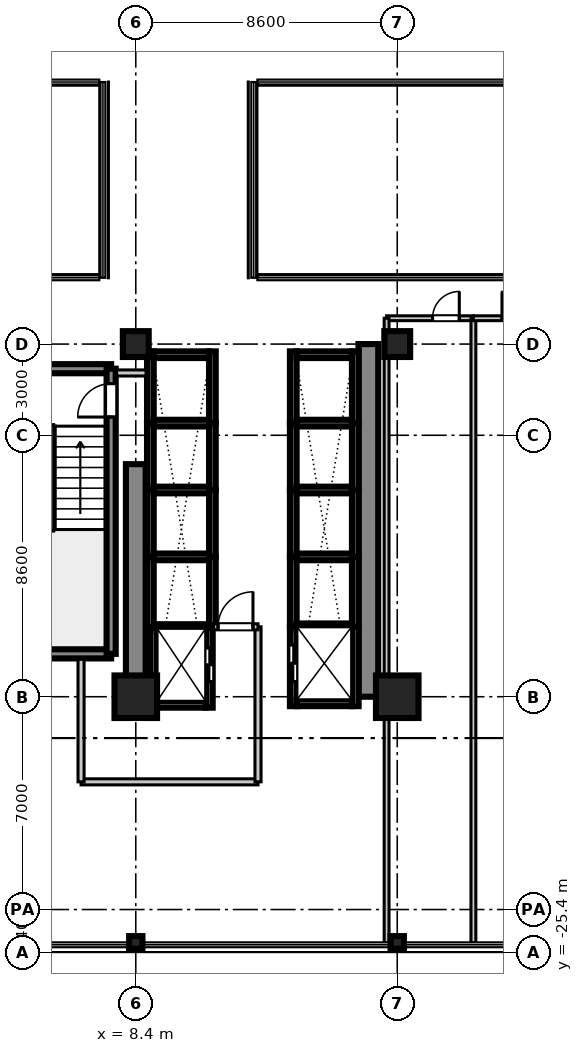
"""IFC4 building model, lengths in metres.
Left out: names, types, materials, properties, quantities, classifications, styles, units other than length and angle.
Written with IfcOpenShell. Run it as: python <this file> out.ifc"""

import sys

from ifc_helpers import new_model, si_unit, direction, frame, frame_2d, origin, origin_2d, place, context, subcontext, project, spatial, rectangle, i_section, extrude, source, transform, mapped, element, fill, save


model = new_model("IFC4")
c1 = context("Model", 3, precision=1e-05, world=origin(), true_north=direction((0.0, 1.0)))
c2 = subcontext(c1, "Body", "Model", "MODEL_VIEW")
j1 = project(units=[si_unit("LENGTHUNIT", "METRE"), si_unit("PLANEANGLEUNIT", "RADIAN")], contexts=[c1])
p1 = place(None, origin())
s1 = spatial("IfcSite", under=j1, at=p1, CompositionType="ELEMENT")
p2 = place(p1, origin())
s2 = spatial("IfcBuilding", under=s1, at=p2, CompositionType="ELEMENT")
p3 = place(p2, frame((0.0, 0.0, 54.3)))
s3 = spatial("IfcBuildingStorey", under=s2, at=p3, CompositionType="ELEMENT", Elevation=54.3)
m1 = source(origin(), c2, "Body", "SweptSolid", [
    extrude(rectangle(XDim=1.4, YDim=1.4, at=origin_2d()), origin(), (0.0, 0.0, 1.0), 3.605),
])
p4 = place(p3, frame((8.4, -17.0, 0.0), z_axis=(0.0, 0.0, 1.0), x_axis=(1.0, 0.0, 0.0)))
e1 = element("IfcColumn", 1, at=p4, inside=s3, PredefinedType="COLUMN", context=c2, shape_type="MappedRepresentation", body=[
    mapped(m1, transform((0.0, 0.0, 0.0), scale=1.0)),
])
m2 = source(origin(), c2, "Body", "SweptSolid", [
    extrude(rectangle(XDim=0.85, YDim=0.85, at=origin_2d()), origin(), (0.0, 0.0, 1.0), 3.605),
])
p5 = place(p3, frame((8.4, -5.4, 0.0), z_axis=(0.0, 0.0, 1.0), x_axis=(1.0, 0.0, 0.0)))
e2 = element("IfcColumn", 2, at=p5, inside=s3, PredefinedType="PILASTER", context=c2, shape_type="MappedRepresentation", body=[
    mapped(m2, transform((0.0, 0.0, 0.0), scale=1.0)),
])
p6 = place(p3, frame((17.0, -17.0, 0.0), z_axis=(0.0, 0.0, 1.0), x_axis=(1.0, 0.0, 0.0)))
e3 = element("IfcColumn", 3, at=p6, inside=s3, PredefinedType="COLUMN", context=c2, shape_type="MappedRepresentation", body=[
    mapped(m1, transform((0.0, 0.0, 0.0), scale=1.0)),
])
p7 = place(p3, frame((17.0, -5.4, 0.0), z_axis=(0.0, 0.0, 1.0), x_axis=(1.0, 0.0, 0.0)))
e4 = element("IfcColumn", 4, at=p7, inside=s3, PredefinedType="PILASTER", context=c2, shape_type="MappedRepresentation", body=[
    mapped(m2, transform((0.0, 0.0, 0.0), scale=1.0)),
])
m3 = source(origin(), c2, "Body", "SweptSolid", [
    extrude(i_section(OverallWidth=0.412, OverallDepth=0.438, WebThickness=0.023, FlangeThickness=0.036, at=origin_2d()), origin(), (0.0, 0.0, 1.0), 3.605),
])
for number, where, z_axis, x_axis in (
    (5, (8.4, -25.08, 0.0), (0.0, 0.0, 1.0), (0.0, 1.0, 0.0)),
    (6, (17.0, -25.08, 0.0), (0.0, 0.0, 1.0), (0.0, 1.0, 0.0)),
):
    element("IfcColumn", number, at=place(p3, frame(where, z_axis=z_axis, x_axis=x_axis)), inside=s3, PredefinedType="COLUMN", context=c2, shape_type="MappedRepresentation", body=[
        mapped(m3, transform((0.0, 0.0, 0.0), scale=1.0)),
    ])
m4 = source(origin(), c2, "Body", "SweptSolid", [
    extrude(rectangle(XDim=7.65, YDim=0.65, at=frame_2d((3.825, 0.0))), origin(), (0.0, 0.0, 1.0), 3.37),
])
p8 = place(p3, frame((8.4, -17.0, 0.0), z_axis=(0.0, 0.0, 1.0), x_axis=(0.0, 1.0, 0.0)))
e7 = element("IfcWall", 7, at=p8, inside=s3, PredefinedType="SHEAR", context=c2, shape_type="MappedRepresentation", body=[
    mapped(m4, transform((0.0, 0.0, 0.0), scale=1.0)),
])
m5 = source(origin(), c2, "Body", "SweptSolid", [
    extrude(rectangle(XDim=11.6, YDim=0.65, at=frame_2d((5.8, 0.0))), origin(), (0.0, 0.0, 1.0), 3.37),
])
p9 = place(p3, frame((16.05, -17.0, 0.0), z_axis=(0.0, 0.0, 1.0), x_axis=(0.0, 1.0, 0.0)))
e8 = element("IfcWall", 8, at=p9, inside=s3, PredefinedType="SHEAR", context=c2, shape_type="MappedRepresentation", body=[
    mapped(m5, transform((0.0, 0.0, 0.0), scale=1.0)),
])
m6 = source(origin(), c2, "Body", "SweptSolid", [
    extrude(rectangle(XDim=3.98, YDim=0.3, at=frame_2d((1.99, 0.0))), origin(), (0.0, 0.0, 1.0), 3.37),
])
for number, where, z_axis, x_axis in (
    (9, (3.61, -15.59, 0.0), (0.0, 0.0, 1.0), (1.0, 0.0, 0.0)),
    (10, (3.61, -6.21, 0.0), (0.0, 0.0, 1.0), (1.0, 0.0, 0.0)),
):
    element("IfcWall", number, at=place(p3, frame(where, z_axis=z_axis, x_axis=x_axis)), inside=s3, PredefinedType="SHEAR", context=c2, shape_type="MappedRepresentation", body=[
        mapped(m6, transform((0.0, 0.0, 0.0), scale=1.0)),
    ])
m7 = source(origin(), c2, "Body", "SweptSolid", [
    extrude(rectangle(XDim=9.38, YDim=0.3, at=frame_2d((4.69, 0.0))), origin(), (0.0, 0.0, 1.0), 3.37),
])
p10 = place(p3, frame((7.59, -15.59, 0.0), z_axis=(0.0, 0.0, 1.0), x_axis=(0.0, 1.0, 0.0)))
e11 = element("IfcWall", 11, at=p10, inside=s3, PredefinedType="SHEAR", context=c2, shape_type="MappedRepresentation", body=[
    mapped(m7, transform((0.0, 0.0, 0.0), scale=1.0)),
])
p11 = place(p10, frame((7.79, 0.0, 0.0)))
e12 = element("IfcOpeningElement", 12, at=p11, cuts=e11, PredefinedType="OPENING", context=c2, shape_type="SweptSolid", body=[
    extrude(rectangle(XDim=1.1, YDim=2.15, at=frame_2d((0.55, 1.075))), frame((0.0, 0.16, 0.0), z_axis=(0.0, -1.0, 0.0), x_axis=(1.0, 0.0, 0.0)), (0.0, 0.0, 1.0), 0.32),
])
m8 = source(origin(), c2, "Body", "SweptSolid", [
    extrude(rectangle(XDim=2.36, YDim=0.22, at=frame_2d((1.18, 0.0))), origin(), (0.0, 0.0, 1.0), 3.37),
])
for number, where, z_axis, x_axis in (
    (13, (13.58, -8.0, 0.0), (0.0, 0.0, 1.0), (0.0, 1.0, 0.0)),
    (14, (15.62, -8.0, 0.0), (0.0, 0.0, 1.0), (0.0, 1.0, 0.0)),
):
    element("IfcWall", number, at=place(p3, frame(where, z_axis=z_axis, x_axis=x_axis)), inside=s3, PredefinedType="SHEAR", context=c2, shape_type="MappedRepresentation", body=[
        mapped(m8, transform((0.0, 0.0, 0.0), scale=1.0)),
    ])
m9 = source(origin(), c2, "Body", "SweptSolid", [
    extrude(rectangle(XDim=1.82, YDim=0.22, at=frame_2d((0.91, 0.0))), origin(), (0.0, 0.0, 1.0), 3.37),
])
p12 = place(p3, frame((13.69, -5.75, 0.0), z_axis=(0.0, 0.0, 1.0), x_axis=(1.0, 0.0, 0.0)))
e15 = element("IfcWall", 15, at=p12, inside=s3, PredefinedType="SHEAR", context=c2, shape_type="MappedRepresentation", body=[
    mapped(m9, transform((0.0, 0.0, 0.0), scale=1.0)),
])
m10 = source(origin(), c2, "Body", "SweptSolid", [
    extrude(rectangle(XDim=2.2, YDim=0.22, at=frame_2d((1.1, 0.0))), origin(), (0.0, 0.0, 1.0), 3.37),
])
for number, where, z_axis, x_axis in (
    (16, (13.58, -10.2, 0.0), (0.0, 0.0, 1.0), (0.0, 1.0, 0.0)),
    (17, (15.62, -10.2, 0.0), (0.0, 0.0, 1.0), (0.0, 1.0, 0.0)),
):
    element("IfcWall", number, at=place(p3, frame(where, z_axis=z_axis, x_axis=x_axis)), inside=s3, PredefinedType="SHEAR", context=c2, shape_type="MappedRepresentation", body=[
        mapped(m10, transform((0.0, 0.0, 0.0), scale=1.0)),
    ])
m11 = source(origin(), c2, "Body", "SweptSolid", [
    extrude(rectangle(XDim=1.82, YDim=0.22, at=frame_2d((0.91, 0.0))), origin(), (0.0, 0.0, 1.0), 3.65),
])
p13 = place(p3, frame((13.69, -8.0, 0.0), z_axis=(0.0, 0.0, 1.0), x_axis=(1.0, 0.0, 0.0)))
e18 = element("IfcWall", 18, at=p13, inside=s3, PredefinedType="SHEAR", context=c2, shape_type="MappedRepresentation", body=[
    mapped(m11, transform((0.0, 0.0, 0.0), scale=1.0)),
])
for number, where, z_axis, x_axis in (
    (19, (13.58, -12.4, 0.0), (0.0, 0.0, 1.0), (0.0, 1.0, 0.0)),
    (20, (15.62, -12.4, 0.0), (0.0, 0.0, 1.0), (0.0, 1.0, 0.0)),
):
    element("IfcWall", number, at=place(p3, frame(where, z_axis=z_axis, x_axis=x_axis)), inside=s3, PredefinedType="SHEAR", context=c2, shape_type="MappedRepresentation", body=[
        mapped(m10, transform((0.0, 0.0, 0.0), scale=1.0)),
    ])
p14 = place(p3, frame((13.69, -10.2, 0.0), z_axis=(0.0, 0.0, 1.0), x_axis=(1.0, 0.0, 0.0)))
e21 = element("IfcWall", 21, at=p14, inside=s3, PredefinedType="SHEAR", context=c2, shape_type="MappedRepresentation", body=[
    mapped(m11, transform((0.0, 0.0, 0.0), scale=1.0)),
])
m12 = source(origin(), c2, "Body", "SweptSolid", [
    extrude(rectangle(XDim=2.3, YDim=0.22, at=frame_2d((1.15, 0.0))), origin(), (0.0, 0.0, 1.0), 3.37),
])
for number, where, z_axis, x_axis in (
    (22, (13.58, -14.7, 0.0), (0.0, 0.0, 1.0), (0.0, 1.0, 0.0)),
    (23, (15.62, -14.7, 0.0), (0.0, 0.0, 1.0), (0.0, 1.0, 0.0)),
):
    element("IfcWall", number, at=place(p3, frame(where, z_axis=z_axis, x_axis=x_axis)), inside=s3, PredefinedType="SHEAR", context=c2, shape_type="MappedRepresentation", body=[
        mapped(m12, transform((0.0, 0.0, 0.0), scale=1.0)),
    ])
p15 = place(p3, frame((13.69, -12.4, 0.0), z_axis=(0.0, 0.0, 1.0), x_axis=(1.0, 0.0, 0.0)))
e24 = element("IfcWall", 24, at=p15, inside=s3, PredefinedType="SHEAR", context=c2, shape_type="MappedRepresentation", body=[
    mapped(m11, transform((0.0, 0.0, 0.0), scale=1.0)),
])
for number, where, z_axis, x_axis in (
    (25, (8.88, -8.0, 0.0), (0.0, 0.0, 1.0), (0.0, 1.0, 0.0)),
    (26, (10.92, -8.0, 0.0), (0.0, 0.0, 1.0), (0.0, 1.0, 0.0)),
):
    element("IfcWall", number, at=place(p3, frame(where, z_axis=z_axis, x_axis=x_axis)), inside=s3, PredefinedType="SHEAR", context=c2, shape_type="MappedRepresentation", body=[
        mapped(m8, transform((0.0, 0.0, 0.0), scale=1.0)),
    ])
p16 = place(p3, frame((8.99, -5.75, 0.0), z_axis=(0.0, 0.0, 1.0), x_axis=(1.0, 0.0, 0.0)))
e27 = element("IfcWall", 27, at=p16, inside=s3, PredefinedType="SHEAR", context=c2, shape_type="MappedRepresentation", body=[
    mapped(m9, transform((0.0, 0.0, 0.0), scale=1.0)),
])
for number, where, z_axis, x_axis in (
    (28, (8.88, -10.2, 0.0), (0.0, 0.0, 1.0), (0.0, 1.0, 0.0)),
    (29, (10.92, -10.2, 0.0), (0.0, 0.0, 1.0), (0.0, 1.0, 0.0)),
):
    element("IfcWall", number, at=place(p3, frame(where, z_axis=z_axis, x_axis=x_axis)), inside=s3, PredefinedType="SHEAR", context=c2, shape_type="MappedRepresentation", body=[
        mapped(m10, transform((0.0, 0.0, 0.0), scale=1.0)),
    ])
p17 = place(p3, frame((8.99, -8.0, 0.0), z_axis=(0.0, 0.0, 1.0), x_axis=(1.0, 0.0, 0.0)))
e30 = element("IfcWall", 30, at=p17, inside=s3, PredefinedType="SHEAR", context=c2, shape_type="MappedRepresentation", body=[
    mapped(m11, transform((0.0, 0.0, 0.0), scale=1.0)),
])
for number, where, z_axis, x_axis in (
    (31, (8.88, -12.4, 0.0), (0.0, 0.0, 1.0), (0.0, 1.0, 0.0)),
    (32, (10.92, -12.4, 0.0), (0.0, 0.0, 1.0), (0.0, 1.0, 0.0)),
):
    element("IfcWall", number, at=place(p3, frame(where, z_axis=z_axis, x_axis=x_axis)), inside=s3, PredefinedType="SHEAR", context=c2, shape_type="MappedRepresentation", body=[
        mapped(m10, transform((0.0, 0.0, 0.0), scale=1.0)),
    ])
p18 = place(p3, frame((8.99, -10.2, 0.0), z_axis=(0.0, 0.0, 1.0), x_axis=(1.0, 0.0, 0.0)))
e33 = element("IfcWall", 33, at=p18, inside=s3, PredefinedType="SHEAR", context=c2, shape_type="MappedRepresentation", body=[
    mapped(m11, transform((0.0, 0.0, 0.0), scale=1.0)),
])
m13 = source(origin(), c2, "Body", "SweptSolid", [
    extrude(rectangle(XDim=2.325, YDim=0.22, at=frame_2d((1.163, 0.0))), origin(), (0.0, 0.0, 1.0), 3.37),
])
for number, where, z_axis, x_axis in (
    (34, (8.88, -14.725, 0.0), (0.0, 0.0, 1.0), (0.0, 1.0, 0.0)),
    (35, (10.92, -14.725, 0.0), (0.0, 0.0, 1.0), (0.0, 1.0, 0.0)),
):
    element("IfcWall", number, at=place(p3, frame(where, z_axis=z_axis, x_axis=x_axis)), inside=s3, PredefinedType="SHEAR", context=c2, shape_type="MappedRepresentation", body=[
        mapped(m13, transform((0.0, 0.0, 0.0), scale=1.0)),
    ])
p19 = place(p3, frame((8.99, -12.4, 0.0), z_axis=(0.0, 0.0, 1.0), x_axis=(1.0, 0.0, 0.0)))
e36 = element("IfcWall", 36, at=p19, inside=s3, PredefinedType="SHEAR", context=c2, shape_type="MappedRepresentation", body=[
    mapped(m11, transform((0.0, 0.0, 0.0), scale=1.0)),
])
m14 = source(origin(), c2, "Body", "SweptSolid", [
    extrude(rectangle(XDim=2.635, YDim=0.22, at=frame_2d((1.317, 0.0))), origin(), (0.0, 0.0, 1.0), 3.37),
])
p20 = place(p3, frame((8.98, -17.36, 0.0), z_axis=(0.0, 0.0, 1.0), x_axis=(0.0, 1.0, 0.0)))
e37 = element("IfcWall", 37, at=p20, inside=s3, PredefinedType="SHEAR", context=c2, shape_type="MappedRepresentation", body=[
    mapped(m14, transform((0.0, 0.0, 0.0), scale=1.0)),
])
p21 = place(p3, frame((10.82, -17.36, 0.0), z_axis=(0.0, 0.0, 1.0), x_axis=(0.0, 1.0, 0.0)))
e38 = element("IfcWall", 38, at=p21, inside=s3, PredefinedType="SHEAR", context=c2, shape_type="MappedRepresentation", body=[
    mapped(m14, transform((0.0, 0.0, 0.0), scale=1.0)),
])
p22 = place(p21, frame((0.86, 0.0, 0.0)))
e39 = element("IfcOpeningElement", 39, at=p22, cuts=e38, PredefinedType="OPENING", context=c2, shape_type="SweptSolid", body=[
    extrude(rectangle(XDim=1.1, YDim=2.2, at=frame_2d((0.55, 1.1))), frame((0.0, 0.12, 0.0), z_axis=(0.0, -1.0, 0.0), x_axis=(1.0, 0.0, 0.0)), (0.0, 0.0, 1.0), 0.24),
])
m15 = source(origin(), c2, "Body", "SweptSolid", [
    extrude(rectangle(XDim=1.62, YDim=0.22, at=frame_2d((0.81, 0.0))), origin(), (0.0, 0.0, 1.0), 3.37),
])
p23 = place(p3, frame((9.09, -17.25, 0.0), z_axis=(0.0, 0.0, 1.0), x_axis=(1.0, 0.0, 0.0)))
e40 = element("IfcWall", 40, at=p23, inside=s3, PredefinedType="SHEAR", context=c2, shape_type="MappedRepresentation", body=[
    mapped(m15, transform((0.0, 0.0, 0.0), scale=1.0)),
])
m16 = source(origin(), c2, "Body", "SweptSolid", [
    extrude(rectangle(XDim=1.62, YDim=0.22, at=frame_2d((0.81, 0.0))), origin(), (0.0, 0.0, 1.0), 3.65),
])
p24 = place(p3, frame((9.09, -14.725, 0.0), z_axis=(0.0, 0.0, 1.0), x_axis=(1.0, 0.0, 0.0)))
e41 = element("IfcWall", 41, at=p24, inside=s3, PredefinedType="SHEAR", context=c2, shape_type="MappedRepresentation", body=[
    mapped(m16, transform((0.0, 0.0, 0.0), scale=1.0)),
])
m17 = source(origin(), c2, "Body", "SweptSolid", [
    extrude(rectangle(XDim=2.61, YDim=0.22, at=frame_2d((1.305, 0.0))), origin(), (0.0, 0.0, 1.0), 3.37),
])
p25 = place(p3, frame((13.58, -17.31, 0.0), z_axis=(0.0, 0.0, 1.0), x_axis=(0.0, 1.0, 0.0)))
e42 = element("IfcWall", 42, at=p25, inside=s3, PredefinedType="SHEAR", context=c2, shape_type="MappedRepresentation", body=[
    mapped(m17, transform((0.0, 0.0, 0.0), scale=1.0)),
])
p26 = place(p25, frame((0.81, 0.0, 0.0)))
e43 = element("IfcOpeningElement", 43, at=p26, cuts=e42, PredefinedType="OPENING", context=c2, shape_type="SweptSolid", body=[
    extrude(rectangle(XDim=1.2, YDim=2.2, at=frame_2d((0.6, 1.1))), frame((0.0, 0.12, 0.0), z_axis=(0.0, -1.0, 0.0), x_axis=(1.0, 0.0, 0.0)), (0.0, 0.0, 1.0), 0.24),
])
p27 = place(p3, frame((15.62, -17.31, 0.0), z_axis=(0.0, 0.0, 1.0), x_axis=(0.0, 1.0, 0.0)))
e44 = element("IfcWall", 44, at=p27, inside=s3, PredefinedType="SHEAR", context=c2, shape_type="MappedRepresentation", body=[
    mapped(m17, transform((0.0, 0.0, 0.0), scale=1.0)),
])
p28 = place(p3, frame((13.69, -17.2, 0.0), z_axis=(0.0, 0.0, 1.0), x_axis=(1.0, 0.0, 0.0)))
e45 = element("IfcWall", 45, at=p28, inside=s3, PredefinedType="SHEAR", context=c2, shape_type="MappedRepresentation", body=[
    mapped(m9, transform((0.0, 0.0, 0.0), scale=1.0)),
])
p29 = place(p3, frame((13.69, -14.7, 0.0), z_axis=(0.0, 0.0, 1.0), x_axis=(1.0, 0.0, 0.0)))
e46 = element("IfcWall", 46, at=p29, inside=s3, PredefinedType="SHEAR", context=c2, shape_type="MappedRepresentation", body=[
    mapped(m11, transform((0.0, 0.0, 0.0), scale=1.0)),
])
m18 = source(origin(), c2, "Body", "SweptSolid", [
    extrude(rectangle(XDim=5.82, YDim=0.2, at=frame_2d((2.91, 0.0))), origin(), (0.0, 0.0, 1.0), 2.71),
])
p30 = place(p3, frame((6.6, -19.8, 0.0), z_axis=(0.0, 0.0, 1.0), x_axis=(1.0, 0.0, 0.0)))
e47 = element("IfcWall", 47, at=p30, inside=s3, PredefinedType="PARTITIONING", context=c2, shape_type="MappedRepresentation", body=[
    mapped(m18, transform((0.0, 0.0, 0.0), scale=1.0)),
])
m19 = source(origin(), c2, "Body", "SweptSolid", [
    extrude(rectangle(XDim=4.03, YDim=0.2, at=frame_2d((2.015, 0.0))), origin(), (0.0, 0.0, 1.0), 2.71),
])
p31 = place(p3, frame((6.6, -19.8, 0.0), z_axis=(0.0, 0.0, 1.0), x_axis=(0.0, 1.0, 0.0)))
e48 = element("IfcWall", 48, at=p31, inside=s3, PredefinedType="PARTITIONING", context=c2, shape_type="MappedRepresentation", body=[
    mapped(m19, transform((0.0, 0.0, 0.0), scale=1.0)),
])
m20 = source(origin(), c2, "Body", "SweptSolid", [
    extrude(rectangle(XDim=5.1, YDim=0.2, at=frame_2d((2.55, 0.0))), origin(), (0.0, 0.0, 1.0), 2.71),
])
p32 = place(p3, frame((12.42, -19.8, 0.0), z_axis=(0.0, 0.0, 1.0), x_axis=(0.0, 1.0, 0.0)))
e49 = element("IfcWall", 49, at=p32, inside=s3, PredefinedType="PARTITIONING", context=c2, shape_type="MappedRepresentation", body=[
    mapped(m20, transform((0.0, 0.0, 0.0), scale=1.0)),
])
m21 = source(origin(), c2, "Body", "SweptSolid", [
    extrude(rectangle(XDim=1.46, YDim=0.2, at=frame_2d((0.73, 0.0))), origin(), (0.0, 0.0, 1.0), 2.71),
])
p33 = place(p3, frame((10.96, -14.7, 0.0), z_axis=(0.0, 0.0, 1.0), x_axis=(1.0, 0.0, 0.0)))
e50 = element("IfcWall", 50, at=p33, inside=s3, PredefinedType="PARTITIONING", context=c2, shape_type="MappedRepresentation", body=[
    mapped(m21, transform((0.0, 0.0, 0.0), scale=1.0)),
])
p34 = place(p33, frame((0.145, 0.0, 0.0)))
e51 = element("IfcOpeningElement", 51, at=p34, cuts=e50, PredefinedType="OPENING", context=c2, shape_type="SweptSolid", body=[
    extrude(rectangle(XDim=1.15, YDim=2.15, at=frame_2d((0.575, 1.075))), frame((0.0, 0.11, 0.0), z_axis=(0.0, -1.0, 0.0), x_axis=(1.0, 0.0, 0.0)), (0.0, 0.0, 1.0), 0.22),
])
m22 = source(origin(), c2, "Body", "SweptSolid", [
    extrude(rectangle(XDim=0.97, YDim=0.2, at=frame_2d((0.485, 0.0))), origin(), (0.0, 0.0, 1.0), 2.71),
])
p35 = place(p3, frame((7.77, -6.35, 0.0), z_axis=(0.0, 0.0, 1.0), x_axis=(1.0, 0.0, 0.0)))
e52 = element("IfcWall", 52, at=p35, inside=s3, PredefinedType="PARTITIONING", context=c2, shape_type="MappedRepresentation", body=[
    mapped(m22, transform((0.0, 0.0, 0.0), scale=1.0)),
])
m23 = source(origin(), c2, "Body", "SweptSolid", [
    extrude(rectangle(XDim=2.855, YDim=0.16, at=frame_2d((1.427, 0.0))), origin(), (0.0, 0.0, 1.0), 2.71),
])
p36 = place(p3, frame((16.65, -4.55, 0.0), z_axis=(0.0, 0.0, 1.0), x_axis=(1.0, 0.0, 0.0)))
e53 = element("IfcWall", 53, at=p36, inside=s3, PredefinedType="PARTITIONING", context=c2, shape_type="MappedRepresentation", body=[
    mapped(m23, transform((0.0, 0.0, 0.0), scale=1.0)),
])
p37 = place(p36, frame((1.511, 0.0, 0.0)))
e54 = element("IfcOpeningElement", 54, at=p37, cuts=e53, PredefinedType="OPENING", context=c2, shape_type="SweptSolid", body=[
    extrude(rectangle(XDim=0.88, YDim=2.1, at=frame_2d((0.44, 1.05))), frame((0.0, 0.09, 0.0), z_axis=(0.0, -1.0, 0.0), x_axis=(1.0, 0.0, 0.0)), (0.0, 0.0, 1.0), 0.18),
])
m24 = source(origin(), c2, "Body", "SweptSolid", [
    extrude(rectangle(XDim=20.55, YDim=0.16, at=frame_2d((10.275, 0.0))), origin(), (0.0, 0.0, 1.0), 2.71),
])
for number, where, z_axis, x_axis in (
    (55, (16.65, -25.1, 0.0), (0.0, 0.0, 1.0), (0.0, 1.0, 0.0)),
    (56, (19.505, -25.1, 0.0), (0.0, 0.0, 1.0), (0.0, 1.0, 0.0)),
):
    element("IfcWall", number, at=place(p3, frame(where, z_axis=z_axis, x_axis=x_axis)), inside=s3, PredefinedType="PARTITIONING", context=c2, shape_type="MappedRepresentation", body=[
        mapped(m24, transform((0.0, 0.0, 0.0), scale=1.0)),
    ])
m25 = source(origin(), c2, "Body", "SweptSolid", [
    extrude(rectangle(XDim=2.855, YDim=0.16, at=frame_2d((1.428, 0.0))), origin(), (0.0, 0.0, 1.0), 2.71),
])
p38 = place(p3, frame((19.505, -4.55, 0.0), z_axis=(0.0, 0.0, 1.0), x_axis=(1.0, 0.0, 0.0)))
e57 = element("IfcWall", 57, at=p38, inside=s3, PredefinedType="PARTITIONING", context=c2, shape_type="MappedRepresentation", body=[
    mapped(m25, transform((0.0, 0.0, 0.0), scale=1.0)),
])
p39 = place(p38, frame((0.94, 0.0, 0.0)))
e58 = element("IfcOpeningElement", 58, at=p39, cuts=e57, PredefinedType="OPENING", context=c2, shape_type="SweptSolid", body=[
    extrude(rectangle(XDim=0.88, YDim=2.1, at=frame_2d((0.44, 1.05))), frame((0.0, 0.09, 0.0), z_axis=(0.0, -1.0, 0.0), x_axis=(1.0, 0.0, 0.0)), (0.0, 0.0, 1.0), 0.18),
])
m26 = source(origin(), c2, "Body", "SweptSolid", [
    extrude(rectangle(XDim=1.1, YDim=2.15, at=frame_2d((0.55, 1.075))), frame((0.0, 0.025, 0.0), z_axis=(0.0, -1.0, 0.0), x_axis=(1.0, 0.0, 0.0)), (0.0, 0.0, 1.0), 0.05),
])
p40 = place(p11, origin())
e59 = element("IfcDoor", 59, at=p40, inside=s3, OperationType="SINGLE_SWING_LEFT", PredefinedType="DOOR", context=c2, shape_type="MappedRepresentation", body=[
    mapped(m26, transform((0.0, 0.0, 0.0), scale=1.0)),
])
fill(e12, e59)
m27 = source(origin(), c2, "Body", "SweptSolid", [
    extrude(rectangle(XDim=1.1, YDim=2.2, at=frame_2d((0.55, 1.1))), frame((0.0, 0.025, 0.0), z_axis=(0.0, -1.0, 0.0), x_axis=(1.0, 0.0, 0.0)), (0.0, 0.0, 1.0), 0.05),
])
p41 = place(p22, frame((1.1, 0.0, 0.0), z_axis=(0.0, 0.0, 1.0), x_axis=(-1.0, 0.0, 0.0)))
e60 = element("IfcDoor", 60, at=p41, inside=s3, OperationType="DOUBLE_DOOR_SLIDING", PredefinedType="DOOR", context=c2, shape_type="MappedRepresentation", body=[
    mapped(m27, transform((0.0, 0.0, 0.0), scale=1.0)),
])
fill(e39, e60)
m28 = source(origin(), c2, "Body", "SweptSolid", [
    extrude(rectangle(XDim=1.2, YDim=2.2, at=frame_2d((0.6, 1.1))), frame((0.0, 0.025, 0.0), z_axis=(0.0, -1.0, 0.0), x_axis=(1.0, 0.0, 0.0)), (0.0, 0.0, 1.0), 0.05),
])
p42 = place(p26, origin())
e61 = element("IfcDoor", 61, at=p42, inside=s3, OperationType="DOUBLE_DOOR_SLIDING", PredefinedType="DOOR", context=c2, shape_type="MappedRepresentation", body=[
    mapped(m28, transform((0.0, 0.0, 0.0), scale=1.0)),
])
fill(e43, e61)
m29 = source(origin(), c2, "Body", "SweptSolid", [
    extrude(rectangle(XDim=1.15, YDim=2.15, at=frame_2d((0.575, 1.075))), frame((0.0, 0.025, 0.0), z_axis=(0.0, -1.0, 0.0), x_axis=(1.0, 0.0, 0.0)), (0.0, 0.0, 1.0), 0.05),
])
p43 = place(p34, origin())
e62 = element("IfcDoor", 62, at=p43, inside=s3, OperationType="SINGLE_SWING_RIGHT", PredefinedType="DOOR", context=c2, shape_type="MappedRepresentation", body=[
    mapped(m29, transform((0.0, 0.0, 0.0), scale=1.0)),
])
fill(e51, e62)
m30 = source(origin(), c2, "Body", "SweptSolid", [
    extrude(rectangle(XDim=0.88, YDim=2.1, at=frame_2d((0.44, 1.05))), frame((0.0, 0.025, 0.0), z_axis=(0.0, -1.0, 0.0), x_axis=(1.0, 0.0, 0.0)), (0.0, 0.0, 1.0), 0.05),
])
p44 = place(p37, frame((0.88, 0.0, 0.0), z_axis=(0.0, 0.0, 1.0), x_axis=(-1.0, 0.0, 0.0)))
e63 = element("IfcDoor", 63, at=p44, inside=s3, OperationType="SINGLE_SWING_RIGHT", PredefinedType="DOOR", context=c2, shape_type="MappedRepresentation", body=[
    mapped(m30, transform((0.0, 0.0, 0.0), scale=1.0)),
])
fill(e54, e63)
p45 = place(p39, frame((0.88, 0.0, 0.0), z_axis=(0.0, 0.0, 1.0), x_axis=(-1.0, 0.0, 0.0)))
e64 = element("IfcDoor", 64, at=p45, inside=s3, OperationType="SINGLE_SWING_LEFT", PredefinedType="DOOR", context=c2, shape_type="MappedRepresentation", body=[
    mapped(m30, transform((0.0, 0.0, 0.0), scale=1.0)),
])
fill(e58, e64)
save(model, sys.argv[1])
